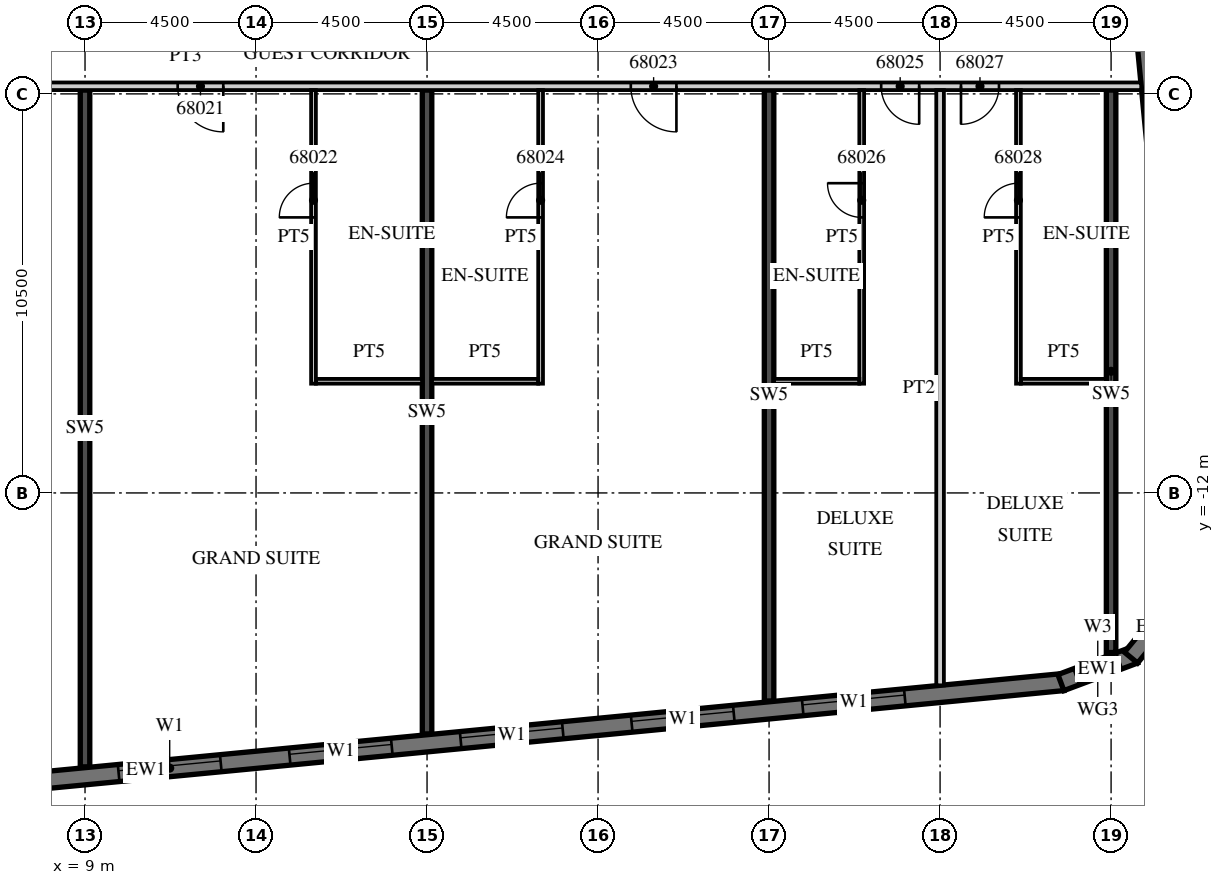
"""IFC4 building model, lengths in metres.
Left out: names, types, materials, properties, quantities, classifications, styles, units other than length and angle.
Written with IfcOpenShell. Run it as: python <this file> out.ifc"""

import sys

from ifc_helpers import new_model, si_unit, direction, frame, frame_2d, origin, place, context, subcontext, project, spatial, polyline, rectangle, outline, extrude, element, fill, save


model = new_model("IFC4")
c1 = context("Model", 3, precision=1e-05, world=origin(), true_north=direction((0.0, 1.0)))
c2 = subcontext(c1, "Body", "Model", "MODEL_VIEW")
j1 = project(units=[si_unit("LENGTHUNIT", "METRE"), si_unit("PLANEANGLEUNIT", "RADIAN")], contexts=[c1])
p1 = place(None, origin())
s1 = spatial("IfcSite", under=j1, at=p1, CompositionType="ELEMENT")
p2 = place(p1, origin())
s2 = spatial("IfcBuilding", under=s1, at=p2, CompositionType="ELEMENT")
p3 = place(p2, frame((0.0, 0.0, 275.1)))
s3 = spatial("IfcBuildingStorey", under=s2, at=p3, CompositionType="ELEMENT", Elevation=275.1)
p4 = place(p3, frame((9.0, -19.207, 0.0), z_axis=(0.0, 0.0, 1.0), x_axis=(0.0, 1.0, 0.0)))
e1 = element("IfcWall", 1, at=p4, inside=s3, PredefinedType="SHEAR", context=c2, shape_type="SweptSolid", body=[
    extrude(rectangle(XDim=17.807, YDim=0.25, at=frame_2d((8.904, 0.0))), origin(), (0.0, 0.0, 1.0), 3.3),
])
p5 = place(p3, frame((18.0, -18.341, 0.0), z_axis=(0.0, 0.0, 1.0), x_axis=(0.0, 1.0, 0.0)))
e2 = element("IfcWall", 2, at=p5, inside=s3, PredefinedType="SHEAR", context=c2, shape_type="SweptSolid", body=[
    extrude(rectangle(XDim=16.941, YDim=0.25, at=frame_2d((8.47, 0.0))), origin(), (0.0, 0.0, 1.0), 3.3),
])
p6 = place(p3, frame((27.0, -17.474, 0.0), z_axis=(0.0, 0.0, 1.0), x_axis=(0.0, 1.0, 0.0)))
e3 = element("IfcWall", 3, at=p6, inside=s3, PredefinedType="SHEAR", context=c2, shape_type="SweptSolid", body=[
    extrude(rectangle(XDim=16.074, YDim=0.25, at=frame_2d((8.037, 0.0))), origin(), (0.0, 0.0, 1.0), 3.3),
])
p7 = place(p3, frame((36.0, -16.199, 0.0), z_axis=(0.0, 0.0, 1.0), x_axis=(0.0, 1.0, 0.0)))
e4 = element("IfcWall", 4, at=p7, inside=s3, PredefinedType="SHEAR", context=c2, shape_type="SweptSolid", body=[
    extrude(rectangle(XDim=14.799, YDim=0.25, at=frame_2d((7.399, 0.0))), origin(), (0.0, 0.0, 1.0), 3.3),
])
p8 = place(p3, frame((-13.521, -21.624, 0.0), z_axis=(0.0, 0.0, 1.0), x_axis=(0.995396186218, 0.095845878695, 0.0)))
e5 = element("IfcWall", 5, at=p8, inside=s3, PredefinedType="SOLIDWALL", context=c2, shape_type="SweptSolid", body=[
    extrude(rectangle(XDim=48.481, YDim=0.45, at=frame_2d((24.241, 0.0))), origin(), (0.0, 0.0, 1.0), 3.02),
])
p9 = place(p8, frame((0.91, 0.0, 0.45)))
e6 = element("IfcOpeningElement", 6, at=p9, cuts=e5, PredefinedType="OPENING", context=c2, shape_type="SweptSolid", body=[
    extrude(rectangle(XDim=2.7, YDim=2.25, at=frame_2d((1.35, 1.125))), frame((0.0, 0.235, 0.0), z_axis=(0.0, -1.0, 0.0), x_axis=(1.0, 0.0, 0.0)), (0.0, 0.0, 1.0), 0.47),
])
p10 = place(p8, frame((5.431, 0.0, 0.45)))
e7 = element("IfcOpeningElement", 7, at=p10, cuts=e5, PredefinedType="OPENING", context=c2, shape_type="SweptSolid", body=[
    extrude(rectangle(XDim=2.7, YDim=2.25, at=frame_2d((1.35, 1.125))), frame((0.0, 0.235, 0.0), z_axis=(0.0, -1.0, 0.0), x_axis=(1.0, 0.0, 0.0)), (0.0, 0.0, 1.0), 0.47),
])
p11 = place(p8, frame((9.952, 0.0, 0.45)))
e8 = element("IfcOpeningElement", 8, at=p11, cuts=e5, PredefinedType="OPENING", context=c2, shape_type="SweptSolid", body=[
    extrude(rectangle(XDim=2.7, YDim=2.25, at=frame_2d((1.35, 1.125))), frame((0.0, 0.235, 0.0), z_axis=(0.0, -1.0, 0.0), x_axis=(1.0, 0.0, 0.0)), (0.0, 0.0, 1.0), 0.47),
])
p12 = place(p8, frame((14.473, 0.0, 0.45)))
e9 = element("IfcOpeningElement", 9, at=p12, cuts=e5, PredefinedType="OPENING", context=c2, shape_type="SweptSolid", body=[
    extrude(rectangle(XDim=2.7, YDim=2.25, at=frame_2d((1.35, 1.125))), frame((0.0, 0.235, 0.0), z_axis=(0.0, -1.0, 0.0), x_axis=(1.0, 0.0, 0.0)), (0.0, 0.0, 1.0), 0.47),
])
p13 = place(p8, frame((18.994, 0.0, 0.45)))
e10 = element("IfcOpeningElement", 10, at=p13, cuts=e5, PredefinedType="OPENING", context=c2, shape_type="SweptSolid", body=[
    extrude(rectangle(XDim=2.7, YDim=2.25, at=frame_2d((1.35, 1.125))), frame((0.0, 0.235, 0.0), z_axis=(0.0, -1.0, 0.0), x_axis=(1.0, 0.0, 0.0)), (0.0, 0.0, 1.0), 0.47),
])
p14 = place(p8, frame((23.514, 0.0, 0.45)))
e11 = element("IfcOpeningElement", 11, at=p14, cuts=e5, PredefinedType="OPENING", context=c2, shape_type="SweptSolid", body=[
    extrude(rectangle(XDim=2.7, YDim=2.25, at=frame_2d((1.35, 1.125))), frame((0.0, 0.235, 0.0), z_axis=(0.0, -1.0, 0.0), x_axis=(1.0, 0.0, 0.0)), (0.0, 0.0, 1.0), 0.47),
])
p15 = place(p8, frame((28.035, 0.0, 0.45)))
e12 = element("IfcOpeningElement", 12, at=p15, cuts=e5, PredefinedType="OPENING", context=c2, shape_type="SweptSolid", body=[
    extrude(rectangle(XDim=2.7, YDim=2.25, at=frame_2d((1.35, 1.125))), frame((0.0, 0.235, 0.0), z_axis=(0.0, -1.0, 0.0), x_axis=(1.0, 0.0, 0.0)), (0.0, 0.0, 1.0), 0.47),
])
p16 = place(p8, frame((32.556, 0.0, 0.45)))
e13 = element("IfcOpeningElement", 13, at=p16, cuts=e5, PredefinedType="OPENING", context=c2, shape_type="SweptSolid", body=[
    extrude(rectangle(XDim=2.7, YDim=2.25, at=frame_2d((1.35, 1.125))), frame((0.0, 0.235, 0.0), z_axis=(0.0, -1.0, 0.0), x_axis=(1.0, 0.0, 0.0)), (0.0, 0.0, 1.0), 0.47),
])
p17 = place(p8, frame((37.077, 0.0, 0.45)))
e14 = element("IfcOpeningElement", 14, at=p17, cuts=e5, PredefinedType="OPENING", context=c2, shape_type="SweptSolid", body=[
    extrude(rectangle(XDim=2.7, YDim=2.25, at=frame_2d((1.35, 1.125))), frame((0.0, 0.235, 0.0), z_axis=(0.0, -1.0, 0.0), x_axis=(1.0, 0.0, 0.0)), (0.0, 0.0, 1.0), 0.47),
])
p18 = place(p8, frame((41.598, 0.0, 0.45)))
e15 = element("IfcOpeningElement", 15, at=p18, cuts=e5, PredefinedType="OPENING", context=c2, shape_type="SweptSolid", body=[
    extrude(rectangle(XDim=2.7, YDim=2.25, at=frame_2d((1.35, 1.125))), frame((0.0, 0.235, 0.0), z_axis=(0.0, -1.0, 0.0), x_axis=(1.0, 0.0, 0.0)), (0.0, 0.0, 1.0), 0.47),
])
p19 = place(p3, frame((34.679, -16.99, 0.0), z_axis=(0.0, 0.0, 1.0), x_axis=(0.936677599948, 0.350192909346, 0.0)))
e16 = element("IfcWall", 16, at=p19, inside=s3, PredefinedType="SOLIDWALL", context=c2, shape_type="SweptSolid", body=[
    extrude(outline(polyline([(0.0, -0.225), (2.071, -0.225), (1.95, 0.225), (0.121, 0.225), (0.0, -0.225)])), origin(), (0.0, 0.0, 1.0), 3.02),
])
p20 = place(p19, frame((0.435, 0.0, 0.45)))
e17 = element("IfcOpeningElement", 17, at=p20, cuts=e16, PredefinedType="OPENING", context=c2, shape_type="SweptSolid", body=[
    extrude(rectangle(XDim=1.2, YDim=2.25, at=frame_2d((0.6, 1.125))), frame((0.0, 0.235, 0.0), z_axis=(0.0, -1.0, 0.0), x_axis=(1.0, 0.0, 0.0)), (0.0, 0.0, 1.0), 0.47),
])
p21 = place(p3, frame((36.524, -16.333, 0.0), z_axis=(0.0, 0.0, 1.0), x_axis=(0.636046112757, 0.771651049663, 0.0)))
e18 = element("IfcWall", 18, at=p21, inside=s3, PredefinedType="SOLIDWALL", context=c2, shape_type="SweptSolid", body=[
    extrude(outline(polyline([(0.0, -0.225), (2.071, -0.225), (1.95, 0.225), (0.121, 0.225), (0.0, -0.225)])), origin(), (0.0, 0.0, 1.0), 3.02),
])
p22 = place(p3, frame((38.132, -12.858, 0.0), z_axis=(0.0, 0.0, 1.0), x_axis=(-0.095847749461, 0.995396006082, 0.0)))
e19 = element("IfcWall", 19, at=p22, inside=s3, PredefinedType="SOLIDWALL", context=c2, shape_type="SweptSolid", body=[
    extrude(rectangle(XDim=32.0, YDim=0.45, at=frame_2d((16.0, 0.0))), origin(), (0.0, 0.0, 1.0), 3.02),
])
p23 = place(p3, frame((-13.5, -1.3, 0.0), z_axis=(0.0, 0.0, 1.0), x_axis=(1.0, 0.0, 0.0)))
e20 = element("IfcWall", 20, at=p23, inside=s3, PredefinedType="PARTITIONING", context=c2, shape_type="SweptSolid", body=[
    extrude(rectangle(XDim=50.293, YDim=0.2, at=frame_2d((25.146, 0.0))), origin(), (0.0, 0.0, 1.0), 3.02),
])
p24 = place(p23, frame((0.575, 0.0, 0.0)))
e21 = element("IfcOpeningElement", 21, at=p24, cuts=e20, PredefinedType="OPENING", context=c2, shape_type="SweptSolid", body=[
    extrude(rectangle(XDim=1.0, YDim=2.1, at=frame_2d((0.5, 1.05))), frame((0.0, 0.11, 0.0), z_axis=(0.0, -1.0, 0.0), x_axis=(1.0, 0.0, 0.0)), (0.0, 0.0, 1.0), 0.22),
])
p25 = place(p23, frame((6.938, 0.0, 0.0)))
e22 = element("IfcOpeningElement", 22, at=p25, cuts=e20, PredefinedType="OPENING", context=c2, shape_type="SweptSolid", body=[
    extrude(rectangle(XDim=1.2, YDim=2.1, at=frame_2d((0.6, 1.05))), frame((0.0, 0.11, 0.0), z_axis=(0.0, -1.0, 0.0), x_axis=(1.0, 0.0, 0.0)), (0.0, 0.0, 1.0), 0.22),
])
p26 = place(p23, frame((18.862, 0.0, 0.0)))
e23 = element("IfcOpeningElement", 23, at=p26, cuts=e20, PredefinedType="OPENING", context=c2, shape_type="SweptSolid", body=[
    extrude(rectangle(XDim=1.2, YDim=2.1, at=frame_2d((0.6, 1.05))), frame((0.0, 0.11, 0.0), z_axis=(0.0, -1.0, 0.0), x_axis=(1.0, 0.0, 0.0)), (0.0, 0.0, 1.0), 0.22),
])
p27 = place(p23, frame((24.938, 0.0, 0.0)))
e24 = element("IfcOpeningElement", 24, at=p27, cuts=e20, PredefinedType="OPENING", context=c2, shape_type="SweptSolid", body=[
    extrude(rectangle(XDim=1.2, YDim=2.1, at=frame_2d((0.6, 1.05))), frame((0.0, 0.11, 0.0), z_axis=(0.0, -1.0, 0.0), x_axis=(1.0, 0.0, 0.0)), (0.0, 0.0, 1.0), 0.22),
])
p28 = place(p23, frame((36.862, 0.0, 0.0)))
e25 = element("IfcOpeningElement", 25, at=p28, cuts=e20, PredefinedType="OPENING", context=c2, shape_type="SweptSolid", body=[
    extrude(rectangle(XDim=1.2, YDim=2.1, at=frame_2d((0.6, 1.05))), frame((0.0, 0.11, 0.0), z_axis=(0.0, -1.0, 0.0), x_axis=(1.0, 0.0, 0.0)), (0.0, 0.0, 1.0), 0.22),
])
p29 = place(p23, frame((43.45, 0.0, 0.0)))
e26 = element("IfcOpeningElement", 26, at=p29, cuts=e20, PredefinedType="OPENING", context=c2, shape_type="SweptSolid", body=[
    extrude(rectangle(XDim=1.0, YDim=2.1, at=frame_2d((0.5, 1.05))), frame((0.0, 0.11, 0.0), z_axis=(0.0, -1.0, 0.0), x_axis=(1.0, 0.0, 0.0)), (0.0, 0.0, 1.0), 0.22),
])
p30 = place(p23, frame((45.55, 0.0, 0.0)))
e27 = element("IfcOpeningElement", 27, at=p30, cuts=e20, PredefinedType="OPENING", context=c2, shape_type="SweptSolid", body=[
    extrude(rectangle(XDim=1.0, YDim=2.1, at=frame_2d((0.5, 1.05))), frame((0.0, 0.11, 0.0), z_axis=(0.0, -1.0, 0.0), x_axis=(1.0, 0.0, 0.0)), (0.0, 0.0, 1.0), 0.22),
])
p31 = place(p3, frame((15.012, -9.125, 0.0), z_axis=(0.0, 0.0, 1.0), x_axis=(0.0, 1.0, 0.0)))
e28 = element("IfcWall", 28, at=p31, inside=s3, PredefinedType="PARTITIONING", context=c2, shape_type="SweptSolid", body=[
    extrude(rectangle(XDim=7.725, YDim=0.125, at=frame_2d((3.863, 0.0))), origin(), (0.0, 0.0, 1.0), 3.02),
])
p32 = place(p31, frame((4.375, 0.0, 0.0)))
e29 = element("IfcOpeningElement", 29, at=p32, cuts=e28, PredefinedType="OPENING", context=c2, shape_type="SweptSolid", body=[
    extrude(rectangle(XDim=0.9, YDim=2.1, at=frame_2d((0.45, 1.05))), frame((0.0, 0.073, 0.0), z_axis=(0.0, -1.0, 0.0), x_axis=(1.0, 0.0, 0.0)), (0.0, 0.0, 1.0), 0.145),
])
p33 = place(p3, frame((15.075, -9.062, 0.0), z_axis=(0.0, 0.0, 1.0), x_axis=(1.0, 0.0, 0.0)))
e30 = element("IfcWall", 30, at=p33, inside=s3, PredefinedType="PARTITIONING", context=c2, shape_type="SweptSolid", body=[
    extrude(rectangle(XDim=2.8, YDim=0.125, at=frame_2d((1.4, 0.0))), origin(), (0.0, 0.0, 1.0), 3.02),
])
p34 = place(p3, frame((20.988, -9.125, 0.0), z_axis=(0.0, 0.0, 1.0), x_axis=(0.0, 1.0, 0.0)))
e31 = element("IfcWall", 31, at=p34, inside=s3, PredefinedType="PARTITIONING", context=c2, shape_type="SweptSolid", body=[
    extrude(rectangle(XDim=7.725, YDim=0.125, at=frame_2d((3.863, 0.0))), origin(), (0.0, 0.0, 1.0), 3.02),
])
p35 = place(p34, frame((4.375, 0.0, 0.0)))
e32 = element("IfcOpeningElement", 32, at=p35, cuts=e31, PredefinedType="OPENING", context=c2, shape_type="SweptSolid", body=[
    extrude(rectangle(XDim=0.9, YDim=2.1, at=frame_2d((0.45, 1.05))), frame((0.0, 0.073, 0.0), z_axis=(0.0, -1.0, 0.0), x_axis=(1.0, 0.0, 0.0)), (0.0, 0.0, 1.0), 0.145),
])
p36 = place(p3, frame((18.125, -9.062, 0.0), z_axis=(0.0, 0.0, 1.0), x_axis=(1.0, 0.0, 0.0)))
e33 = element("IfcWall", 33, at=p36, inside=s3, PredefinedType="PARTITIONING", context=c2, shape_type="SweptSolid", body=[
    extrude(rectangle(XDim=2.8, YDim=0.125, at=frame_2d((1.4, 0.0))), origin(), (0.0, 0.0, 1.0), 3.02),
])
p37 = place(p3, frame((31.5, -17.063, 0.0), z_axis=(0.0, 0.0, 1.0), x_axis=(0.0, 1.0, 0.0)))
e34 = element("IfcWall", 34, at=p37, inside=s3, PredefinedType="PARTITIONING", context=c2, shape_type="SweptSolid", body=[
    extrude(rectangle(XDim=15.663, YDim=0.2, at=frame_2d((7.832, 0.0))), origin(), (0.0, 0.0, 1.0), 3.02),
])
p38 = place(p3, frame((29.438, -9.125, 0.0), z_axis=(0.0, 0.0, 1.0), x_axis=(0.0, 1.0, 0.0)))
e35 = element("IfcWall", 35, at=p38, inside=s3, PredefinedType="PARTITIONING", context=c2, shape_type="SweptSolid", body=[
    extrude(rectangle(XDim=7.725, YDim=0.125, at=frame_2d((3.863, 0.0))), origin(), (0.0, 0.0, 1.0), 3.02),
])
p39 = place(p38, frame((4.375, 0.0, 0.0)))
e36 = element("IfcOpeningElement", 36, at=p39, cuts=e35, PredefinedType="OPENING", context=c2, shape_type="SweptSolid", body=[
    extrude(rectangle(XDim=0.9, YDim=2.1, at=frame_2d((0.45, 1.05))), frame((0.0, 0.073, 0.0), z_axis=(0.0, -1.0, 0.0), x_axis=(1.0, 0.0, 0.0)), (0.0, 0.0, 1.0), 0.145),
])
p40 = place(p3, frame((27.125, -9.062, 0.0), z_axis=(0.0, 0.0, 1.0), x_axis=(1.0, 0.0, 0.0)))
e37 = element("IfcWall", 37, at=p40, inside=s3, PredefinedType="PARTITIONING", context=c2, shape_type="SweptSolid", body=[
    extrude(rectangle(XDim=2.25, YDim=0.125, at=frame_2d((1.125, 0.0))), origin(), (0.0, 0.0, 1.0), 3.02),
])
p41 = place(p3, frame((33.562, -9.125, 0.0), z_axis=(0.0, 0.0, 1.0), x_axis=(0.0, 1.0, 0.0)))
e38 = element("IfcWall", 38, at=p41, inside=s3, PredefinedType="PARTITIONING", context=c2, shape_type="SweptSolid", body=[
    extrude(rectangle(XDim=7.725, YDim=0.125, at=frame_2d((3.863, 0.0))), origin(), (0.0, 0.0, 1.0), 3.02),
])
p42 = place(p41, frame((4.375, 0.0, 0.0)))
e39 = element("IfcOpeningElement", 39, at=p42, cuts=e38, PredefinedType="OPENING", context=c2, shape_type="SweptSolid", body=[
    extrude(rectangle(XDim=0.9, YDim=2.1, at=frame_2d((0.45, 1.05))), frame((0.0, 0.073, 0.0), z_axis=(0.0, -1.0, 0.0), x_axis=(1.0, 0.0, 0.0)), (0.0, 0.0, 1.0), 0.145),
])
p43 = place(p3, frame((33.625, -9.062, 0.0), z_axis=(0.0, 0.0, 1.0), x_axis=(1.0, 0.0, 0.0)))
e40 = element("IfcWall", 40, at=p43, inside=s3, PredefinedType="PARTITIONING", context=c2, shape_type="SweptSolid", body=[
    extrude(rectangle(XDim=2.25, YDim=0.125, at=frame_2d((1.125, 0.0))), origin(), (0.0, 0.0, 1.0), 3.02),
])
p44 = place(p14, origin())
e41 = element("IfcWindow", 41, at=p44, inside=s3, PartitioningType="SINGLE_PANEL", PredefinedType="WINDOW", context=c2, shape_type="SweptSolid", body=[
    extrude(rectangle(XDim=2.7, YDim=2.25, at=frame_2d((1.35, 1.125))), frame((0.0, 0.09, 0.0), z_axis=(0.0, -1.0, 0.0), x_axis=(1.0, 0.0, 0.0)), (0.0, 0.0, 1.0), 0.06),
])
fill(e11, e41)
p45 = place(p15, origin())
e42 = element("IfcWindow", 42, at=p45, inside=s3, PartitioningType="SINGLE_PANEL", PredefinedType="WINDOW", context=c2, shape_type="SweptSolid", body=[
    extrude(rectangle(XDim=2.7, YDim=2.25, at=frame_2d((1.35, 1.125))), frame((0.0, 0.09, 0.0), z_axis=(0.0, -1.0, 0.0), x_axis=(1.0, 0.0, 0.0)), (0.0, 0.0, 1.0), 0.06),
])
fill(e12, e42)
p46 = place(p16, origin())
e43 = element("IfcWindow", 43, at=p46, inside=s3, PartitioningType="SINGLE_PANEL", PredefinedType="WINDOW", context=c2, shape_type="SweptSolid", body=[
    extrude(rectangle(XDim=2.7, YDim=2.25, at=frame_2d((1.35, 1.125))), frame((0.0, 0.09, 0.0), z_axis=(0.0, -1.0, 0.0), x_axis=(1.0, 0.0, 0.0)), (0.0, 0.0, 1.0), 0.06),
])
fill(e13, e43)
p47 = place(p17, origin())
e44 = element("IfcWindow", 44, at=p47, inside=s3, PartitioningType="SINGLE_PANEL", PredefinedType="WINDOW", context=c2, shape_type="SweptSolid", body=[
    extrude(rectangle(XDim=2.7, YDim=2.25, at=frame_2d((1.35, 1.125))), frame((0.0, 0.09, 0.0), z_axis=(0.0, -1.0, 0.0), x_axis=(1.0, 0.0, 0.0)), (0.0, 0.0, 1.0), 0.06),
])
fill(e14, e44)
p48 = place(p18, origin())
e45 = element("IfcWindow", 45, at=p48, inside=s3, PartitioningType="SINGLE_PANEL", PredefinedType="WINDOW", context=c2, shape_type="SweptSolid", body=[
    extrude(rectangle(XDim=2.7, YDim=2.25, at=frame_2d((1.35, 1.125))), frame((0.0, 0.09, 0.0), z_axis=(0.0, -1.0, 0.0), x_axis=(1.0, 0.0, 0.0)), (0.0, 0.0, 1.0), 0.06),
])
fill(e15, e45)
p49 = place(p20, origin())
e46 = element("IfcWindow", 46, at=p49, inside=s3, PartitioningType="SINGLE_PANEL", PredefinedType="WINDOW", context=c2, shape_type="SweptSolid", body=[
    extrude(rectangle(XDim=1.2, YDim=2.25, at=frame_2d((0.6, 1.125))), frame((0.0, 0.09, 0.0), z_axis=(0.0, -1.0, 0.0), x_axis=(1.0, 0.0, 0.0)), (0.0, 0.0, 1.0), 0.06),
])
fill(e17, e46)
p50 = place(p27, origin())
e47 = element("IfcDoor", 47, at=p50, inside=s3, OperationType="SINGLE_SWING_RIGHT", PredefinedType="DOOR", context=c2, shape_type="SweptSolid", body=[
    extrude(rectangle(XDim=1.2, YDim=2.1, at=frame_2d((0.6, 1.05))), frame((0.0, 0.025, 0.0), z_axis=(0.0, -1.0, 0.0), x_axis=(1.0, 0.0, 0.0)), (0.0, 0.0, 1.0), 0.05),
])
fill(e24, e47)
p51 = place(p32, origin())
e48 = element("IfcDoor", 48, at=p51, inside=s3, OperationType="SINGLE_SWING_LEFT", PredefinedType="DOOR", context=c2, shape_type="SweptSolid", body=[
    extrude(rectangle(XDim=0.9, YDim=2.1, at=frame_2d((0.45, 1.05))), frame((0.0, 0.025, 0.0), z_axis=(0.0, -1.0, 0.0), x_axis=(1.0, 0.0, 0.0)), (0.0, 0.0, 1.0), 0.05),
])
fill(e29, e48)
p52 = place(p28, origin())
e49 = element("IfcDoor", 49, at=p52, inside=s3, OperationType="SINGLE_SWING_RIGHT", PredefinedType="DOOR", context=c2, shape_type="SweptSolid", body=[
    extrude(rectangle(XDim=1.2, YDim=2.1, at=frame_2d((0.6, 1.05))), frame((0.0, 0.025, 0.0), z_axis=(0.0, -1.0, 0.0), x_axis=(1.0, 0.0, 0.0)), (0.0, 0.0, 1.0), 0.05),
])
fill(e25, e49)
p53 = place(p35, origin())
e50 = element("IfcDoor", 50, at=p53, inside=s3, OperationType="SINGLE_SWING_LEFT", PredefinedType="DOOR", context=c2, shape_type="SweptSolid", body=[
    extrude(rectangle(XDim=0.9, YDim=2.1, at=frame_2d((0.45, 1.05))), frame((0.0, 0.025, 0.0), z_axis=(0.0, -1.0, 0.0), x_axis=(1.0, 0.0, 0.0)), (0.0, 0.0, 1.0), 0.05),
])
fill(e32, e50)
p54 = place(p29, origin())
e51 = element("IfcDoor", 51, at=p54, inside=s3, OperationType="SINGLE_SWING_RIGHT", PredefinedType="DOOR", context=c2, shape_type="SweptSolid", body=[
    extrude(rectangle(XDim=1.0, YDim=2.1, at=frame_2d((0.5, 1.05))), frame((0.0, 0.025, 0.0), z_axis=(0.0, -1.0, 0.0), x_axis=(1.0, 0.0, 0.0)), (0.0, 0.0, 1.0), 0.05),
])
fill(e26, e51)
p55 = place(p39, origin())
e52 = element("IfcDoor", 52, at=p55, inside=s3, OperationType="SINGLE_SWING_RIGHT", PredefinedType="DOOR", context=c2, shape_type="SweptSolid", body=[
    extrude(rectangle(XDim=0.9, YDim=2.1, at=frame_2d((0.45, 1.05))), frame((0.0, 0.025, 0.0), z_axis=(0.0, -1.0, 0.0), x_axis=(1.0, 0.0, 0.0)), (0.0, 0.0, 1.0), 0.05),
])
fill(e36, e52)
p56 = place(p30, origin())
e53 = element("IfcDoor", 53, at=p56, inside=s3, OperationType="SINGLE_SWING_LEFT", PredefinedType="DOOR", context=c2, shape_type="SweptSolid", body=[
    extrude(rectangle(XDim=1.0, YDim=2.1, at=frame_2d((0.5, 1.05))), frame((0.0, 0.025, 0.0), z_axis=(0.0, -1.0, 0.0), x_axis=(1.0, 0.0, 0.0)), (0.0, 0.0, 1.0), 0.05),
])
fill(e27, e53)
p57 = place(p42, origin())
e54 = element("IfcDoor", 54, at=p57, inside=s3, OperationType="SINGLE_SWING_LEFT", PredefinedType="DOOR", context=c2, shape_type="SweptSolid", body=[
    extrude(rectangle(XDim=0.9, YDim=2.1, at=frame_2d((0.45, 1.05))), frame((0.0, 0.025, 0.0), z_axis=(0.0, -1.0, 0.0), x_axis=(1.0, 0.0, 0.0)), (0.0, 0.0, 1.0), 0.05),
])
fill(e39, e54)
save(model, sys.argv[1])
